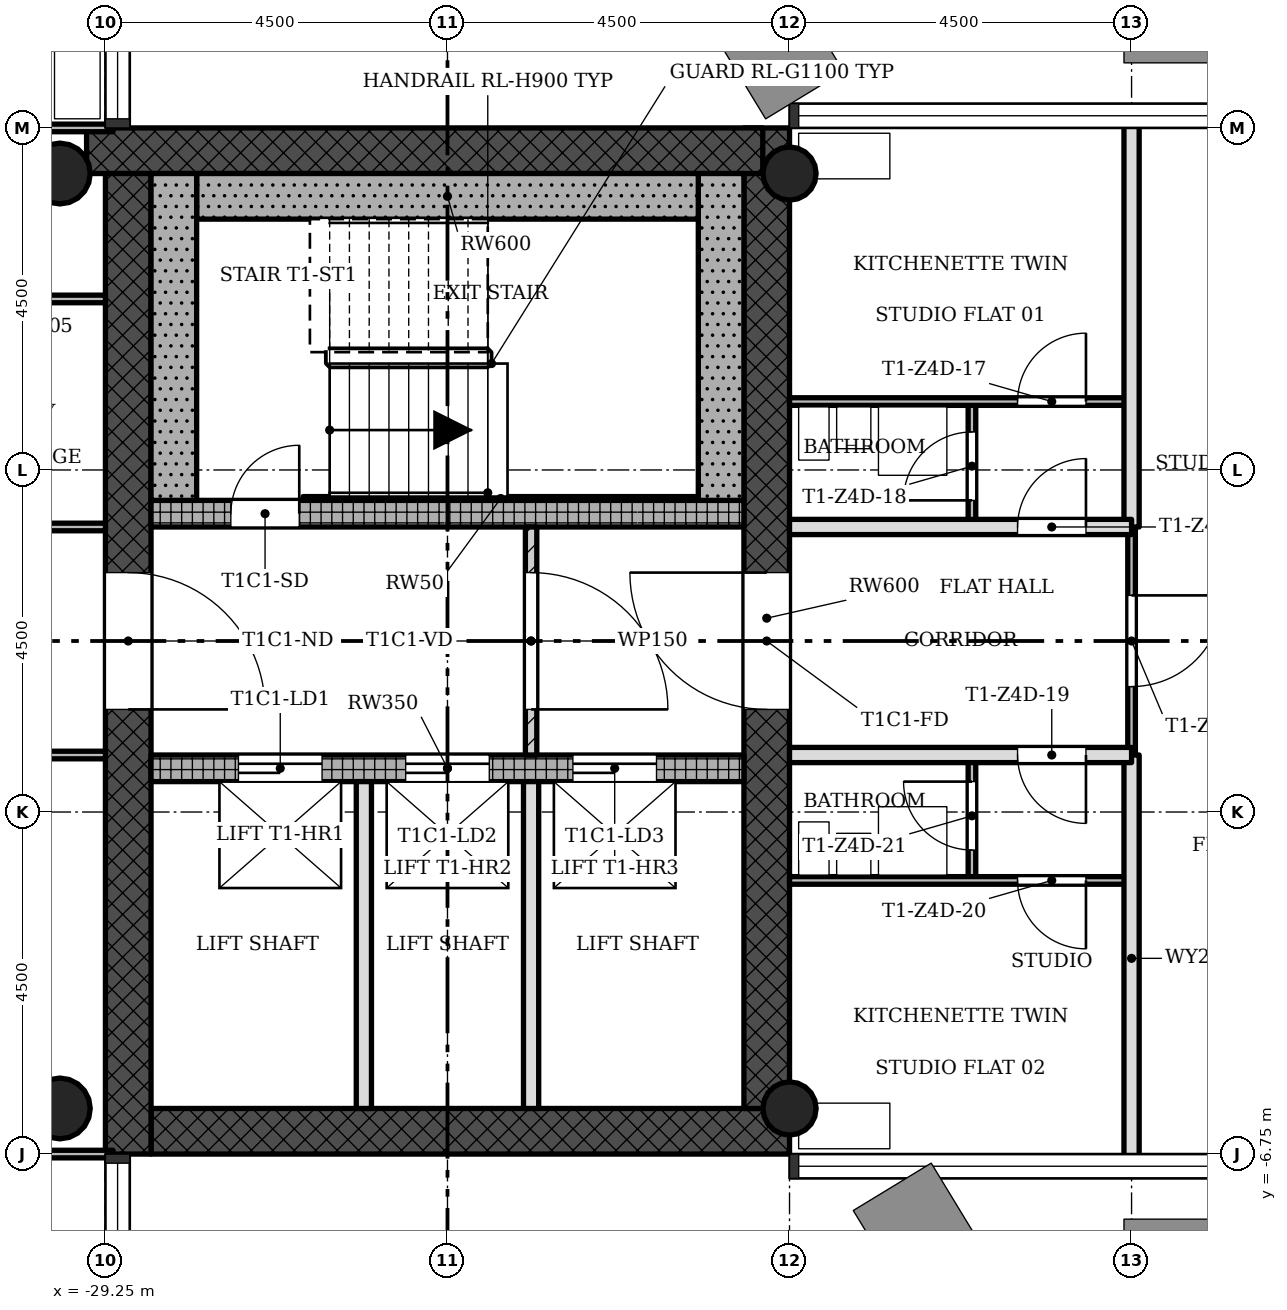
"""IFC4 building model, lengths in metres.
Left out: names, types, materials, properties, quantities, classifications, styles, units other than length and angle.
Written with IfcOpenShell. Run it as: python <this file> out.ifc"""

import sys

from ifc_helpers import new_model, si_unit, direction, frame, frame_2d, origin, origin_2d, place, context, subcontext, project, spatial, rectangle, hollow_circle, extrude, element, fill, save


model = new_model("IFC4")
c1 = context("Model", 3, precision=1e-05, world=origin(), true_north=direction((0.0, 1.0)))
c2 = subcontext(c1, "Body", "Model", "MODEL_VIEW")
j1 = project(units=[si_unit("LENGTHUNIT", "METRE"), si_unit("PLANEANGLEUNIT", "RADIAN")], contexts=[c1])
p1 = place(None, origin())
s1 = spatial("IfcSite", under=j1, at=p1, CompositionType="ELEMENT")
p2 = place(p1, origin())
s2 = spatial("IfcBuilding", under=s1, at=p2, CompositionType="ELEMENT")
p3 = place(p2, frame((0.0, 0.0, 196.0)))
s3 = spatial("IfcBuildingStorey", under=s2, at=p3, CompositionType="ELEMENT", Elevation=196.0)
p4 = place(p3, frame((-28.65, -6.45, 0.0), z_axis=(0.0, 0.0, 1.0), x_axis=(1.0, 0.0, 0.0)))
e1 = element("IfcWall", 1, at=p4, inside=s3, PredefinedType="SHEAR", context=c2, shape_type="SweptSolid", body=[
    extrude(rectangle(XDim=8.4, YDim=0.6, at=frame_2d((4.2, 0.0))), origin(), (0.0, 0.0, 1.0), 3.4),
])
p5 = place(p3, frame((-20.55, -6.15, 0.0), z_axis=(0.0, 0.0, 1.0), x_axis=(0.0, 1.0, 0.0)))
e2 = element("IfcWall", 2, at=p5, inside=s3, PredefinedType="SHEAR", context=c2, shape_type="SweptSolid", body=[
    extrude(rectangle(XDim=12.9, YDim=0.6, at=frame_2d((6.45, 0.0))), origin(), (0.0, 0.0, 1.0), 3.4),
])
p6 = place(p5, frame((5.25, 0.0, 0.0)))
e3 = element("IfcOpeningElement", 3, at=p6, cuts=e2, PredefinedType="OPENING", context=c2, shape_type="SweptSolid", body=[
    extrude(rectangle(XDim=1.8, YDim=2.1, at=frame_2d((0.9, 1.05))), frame((0.0, 0.31, 0.0), z_axis=(0.0, -1.0, 0.0), x_axis=(1.0, 0.0, 0.0)), (0.0, 0.0, 1.0), 0.62),
])
p7 = place(p3, frame((-20.602, 6.45, 0.0), z_axis=(0.0, 0.0, 1.0), x_axis=(-1.0, 0.0, 0.0)))
e4 = element("IfcWall", 4, at=p7, inside=s3, PredefinedType="SHEAR", context=c2, shape_type="SweptSolid", body=[
    extrude(rectangle(XDim=8.896, YDim=0.6, at=frame_2d((4.448, 0.0))), origin(), (0.0, 0.0, 1.0), 3.4),
])
p8 = place(p3, frame((-28.95, 6.15, 0.0), z_axis=(0.0, 0.0, 1.0), x_axis=(0.0, -1.0, 0.0)))
e5 = element("IfcWall", 5, at=p8, inside=s3, PredefinedType="SHEAR", context=c2, shape_type="SweptSolid", body=[
    extrude(rectangle(XDim=12.9, YDim=0.6, at=frame_2d((6.45, 0.0))), origin(), (0.0, 0.0, 1.0), 3.4),
])
p9 = place(p8, frame((5.25, 0.0, 0.0)))
e6 = element("IfcOpeningElement", 6, at=p9, cuts=e5, PredefinedType="OPENING", context=c2, shape_type="SweptSolid", body=[
    extrude(rectangle(XDim=1.8, YDim=2.1, at=frame_2d((0.9, 1.05))), frame((0.0, 0.31, 0.0), z_axis=(0.0, -1.0, 0.0), x_axis=(1.0, 0.0, 0.0)), (0.0, 0.0, 1.0), 0.62),
])
p10 = place(p3, frame((-28.65, -1.675, 0.0), z_axis=(0.0, 0.0, 1.0), x_axis=(1.0, 0.0, 0.0)))
e7 = element("IfcWall", 7, at=p10, inside=s3, PredefinedType="SHEAR", context=c2, shape_type="SweptSolid", body=[
    extrude(rectangle(XDim=7.8, YDim=0.35, at=frame_2d((3.9, 0.0))), origin(), (0.0, 0.0, 1.0), 3.4),
])
p11 = place(p10, frame((1.15, 0.0, 0.0)))
e8 = element("IfcOpeningElement", 8, at=p11, cuts=e7, PredefinedType="OPENING", context=c2, shape_type="SweptSolid", body=[
    extrude(rectangle(XDim=1.1, YDim=2.1, at=frame_2d((0.55, 1.05))), frame((0.0, 0.185, 0.0), z_axis=(0.0, -1.0, 0.0), x_axis=(1.0, 0.0, 0.0)), (0.0, 0.0, 1.0), 0.37),
])
p12 = place(p10, frame((3.35, 0.0, 0.0)))
e9 = element("IfcOpeningElement", 9, at=p12, cuts=e7, PredefinedType="OPENING", context=c2, shape_type="SweptSolid", body=[
    extrude(rectangle(XDim=1.1, YDim=2.1, at=frame_2d((0.55, 1.05))), frame((0.0, 0.185, 0.0), z_axis=(0.0, -1.0, 0.0), x_axis=(1.0, 0.0, 0.0)), (0.0, 0.0, 1.0), 0.37),
])
p13 = place(p10, frame((5.55, 0.0, 0.0)))
e10 = element("IfcOpeningElement", 10, at=p13, cuts=e7, PredefinedType="OPENING", context=c2, shape_type="SweptSolid", body=[
    extrude(rectangle(XDim=1.1, YDim=2.1, at=frame_2d((0.55, 1.05))), frame((0.0, 0.185, 0.0), z_axis=(0.0, -1.0, 0.0), x_axis=(1.0, 0.0, 0.0)), (0.0, 0.0, 1.0), 0.37),
])
p14 = place(p3, frame((-28.65, 1.675, 0.0), z_axis=(0.0, 0.0, 1.0), x_axis=(1.0, 0.0, 0.0)))
e11 = element("IfcWall", 11, at=p14, inside=s3, PredefinedType="SHEAR", context=c2, shape_type="SweptSolid", body=[
    extrude(rectangle(XDim=7.8, YDim=0.35, at=frame_2d((3.9, 0.0))), origin(), (0.0, 0.0, 1.0), 3.4),
])
p15 = place(p14, frame((1.05, 0.0, 0.0)))
e12 = element("IfcOpeningElement", 12, at=p15, cuts=e11, PredefinedType="OPENING", context=c2, shape_type="SweptSolid", body=[
    extrude(rectangle(XDim=0.9, YDim=2.1, at=frame_2d((0.45, 1.05))), frame((0.0, 0.185, 0.0), z_axis=(0.0, -1.0, 0.0), x_axis=(1.0, 0.0, 0.0)), (0.0, 0.0, 1.0), 0.37),
])
for number, where, z_axis, x_axis in (
    (13, (-20.25, -6.15, 0.0), (0.0, 0.0, 1.0), (1.0, 0.0, 0.0)),
    (14, (-20.25, 6.15, 0.0), (0.0, 0.0, 1.0), (1.0, 0.0, 0.0)),
):
    element("IfcColumn", number, at=place(p3, frame(where, z_axis=z_axis, x_axis=x_axis)), inside=s3, PredefinedType="COLUMN", context=c2, shape_type="SweptSolid", body=[
        extrude(hollow_circle(Radius=0.35, WallThickness=0.025, at=origin_2d()), origin(), (0.0, 0.0, 1.0), 3.4),
    ])
for number, where, z_axis, x_axis in (
    (15, (-29.85, -6.15, 0.0), (0.0, 0.0, 1.0), (1.0, 0.0, 0.0)),
    (16, (-29.85, 6.15, 0.0), (0.0, 0.0, 1.0), (1.0, 0.0, 0.0)),
):
    element("IfcColumn", number, at=place(p3, frame(where, z_axis=z_axis, x_axis=x_axis)), inside=s3, PredefinedType="COLUMN", context=c2, shape_type="SweptSolid", body=[
        extrude(hollow_circle(Radius=0.4, WallThickness=0.028, at=origin_2d()), origin(), (0.0, 0.0, 1.0), 3.4),
    ])
p16 = place(p3, frame((-23.65, -1.5, 0.0), z_axis=(0.0, 0.0, 1.0), x_axis=(0.0, 1.0, 0.0)))
e17 = element("IfcWall", 17, at=p16, inside=s3, PredefinedType="PARTITIONING", context=c2, shape_type="SweptSolid", body=[
    extrude(rectangle(XDim=3.0, YDim=0.15, at=frame_2d((1.5, 0.0))), origin(), (0.0, 0.0, 1.0), 3.0),
])
p17 = place(p16, frame((0.6, 0.0, 0.0)))
e18 = element("IfcOpeningElement", 18, at=p17, cuts=e17, PredefinedType="OPENING", context=c2, shape_type="SweptSolid", body=[
    extrude(rectangle(XDim=1.8, YDim=2.1, at=frame_2d((0.9, 1.05))), frame((0.0, 0.085, 0.0), z_axis=(0.0, -1.0, 0.0), x_axis=(1.0, 0.0, 0.0)), (0.0, 0.0, 1.0), 0.17),
])
for number, where, z_axis, x_axis in (
    (19, (-25.85, -6.15, 0.0), (0.0, 0.0, 1.0), (0.0, 1.0, 0.0)),
    (20, (-23.65, -6.15, 0.0), (0.0, 0.0, 1.0), (0.0, 1.0, 0.0)),
):
    element("IfcWall", number, at=place(p3, frame(where, z_axis=z_axis, x_axis=x_axis)), inside=s3, PredefinedType="SOLIDWALL", context=c2, shape_type="SweptSolid", body=[
        extrude(rectangle(XDim=4.3, YDim=0.2, at=frame_2d((2.15, 0.0))), origin(), (0.0, 0.0, 1.0), 3.0),
    ])
p18 = place(p3, frame((-17.85, -3.15, 0.0), z_axis=(0.0, 0.0, 1.0), x_axis=(0.0, 1.0, 0.0)))
e21 = element("IfcWall", 21, at=p18, inside=s3, PredefinedType="PARTITIONING", context=c2, shape_type="SweptSolid", body=[
    extrude(rectangle(XDim=1.65, YDim=0.1, at=frame_2d((0.825, 0.0))), origin(), (0.0, 0.0, 1.0), 3.0),
])
p19 = place(p18, frame((0.4, 0.0, 0.0)))
e22 = element("IfcOpeningElement", 22, at=p19, cuts=e21, PredefinedType="OPENING", context=c2, shape_type="SweptSolid", body=[
    extrude(rectangle(XDim=0.9, YDim=2.1, at=frame_2d((0.45, 1.05))), frame((0.0, 0.06, 0.0), z_axis=(0.0, -1.0, 0.0), x_axis=(1.0, 0.0, 0.0)), (0.0, 0.0, 1.0), 0.12),
])
p20 = place(p3, frame((-17.85, 1.5, 0.0), z_axis=(0.0, 0.0, 1.0), x_axis=(0.0, 1.0, 0.0)))
e23 = element("IfcWall", 23, at=p20, inside=s3, PredefinedType="PARTITIONING", context=c2, shape_type="SweptSolid", body=[
    extrude(rectangle(XDim=1.65, YDim=0.1, at=frame_2d((0.825, 0.0))), origin(), (0.0, 0.0, 1.0), 3.0),
])
p21 = place(p20, frame((0.35, 0.0, 0.0)))
e24 = element("IfcOpeningElement", 24, at=p21, cuts=e23, PredefinedType="OPENING", context=c2, shape_type="SweptSolid", body=[
    extrude(rectangle(XDim=0.9, YDim=2.1, at=frame_2d((0.45, 1.05))), frame((0.0, 0.06, 0.0), z_axis=(0.0, -1.0, 0.0), x_axis=(1.0, 0.0, 0.0)), (0.0, 0.0, 1.0), 0.12),
])
p22 = place(p3, frame((-15.75, -1.5, 0.0), z_axis=(0.0, 0.0, 1.0), x_axis=(0.0, 1.0, 0.0)))
e25 = element("IfcWall", 25, at=p22, inside=s3, PredefinedType="PARTITIONING", context=c2, shape_type="SweptSolid", body=[
    extrude(rectangle(XDim=3.0, YDim=0.1, at=frame_2d((1.5, 0.0))), origin(), (0.0, 0.0, 1.0), 3.0),
])
p23 = place(p22, frame((0.9, 0.0, 0.0)))
e26 = element("IfcOpeningElement", 26, at=p23, cuts=e25, PredefinedType="OPENING", context=c2, shape_type="SweptSolid", body=[
    extrude(rectangle(XDim=1.2, YDim=2.1, at=frame_2d((0.6, 1.05))), frame((0.0, 0.06, 0.0), z_axis=(0.0, -1.0, 0.0), x_axis=(1.0, 0.0, 0.0)), (0.0, 0.0, 1.0), 0.12),
])
for number, where, z_axis, x_axis in (
    (27, (-15.75, -6.85, 0.0), (0.0, 0.0, 1.0), (0.0, 1.0, 0.0)),
    (28, (-15.75, 1.5, 0.0), (0.0, 0.0, 1.0), (0.0, 1.0, 0.0)),
):
    element("IfcWall", number, at=place(p3, frame(where, z_axis=z_axis, x_axis=x_axis)), inside=s3, PredefinedType="SOLIDWALL", context=c2, shape_type="SweptSolid", body=[
        extrude(rectangle(XDim=5.35, YDim=0.2, at=frame_2d((2.675, 0.0))), origin(), (0.0, 0.0, 1.0), 3.0),
    ])
p24 = place(p3, frame((-35.1, -6.75, 0.0), z_axis=(0.0, 0.0, 1.0), x_axis=(1.0, 0.0, 0.0)))
e29 = element("IfcWall", 29, at=p24, inside=s3, PredefinedType="PARTITIONING", context=c2, shape_type="SweptSolid", body=[
    extrude(rectangle(XDim=5.95, YDim=0.1, at=frame_2d((2.975, 0.0))), origin(), (0.0, 0.0, 1.0), 3.0),
])
p25 = place(p3, frame((-20.25, -3.15, 0.0), z_axis=(0.0, 0.0, 1.0), x_axis=(1.0, 0.0, 0.0)))
e30 = element("IfcWall", 30, at=p25, inside=s3, PredefinedType="PARTITIONING", context=c2, shape_type="SweptSolid", body=[
    extrude(rectangle(XDim=4.5, YDim=0.1, at=frame_2d((2.25, 0.0))), origin(), (0.0, 0.0, 1.0), 3.0),
])
p26 = place(p25, frame((3.0, 0.0, 0.0)))
e31 = element("IfcOpeningElement", 31, at=p26, cuts=e30, PredefinedType="OPENING", context=c2, shape_type="SweptSolid", body=[
    extrude(rectangle(XDim=0.9, YDim=2.1, at=frame_2d((0.45, 1.05))), frame((0.0, 0.06, 0.0), z_axis=(0.0, -1.0, 0.0), x_axis=(1.0, 0.0, 0.0)), (0.0, 0.0, 1.0), 0.12),
])
p27 = place(p3, frame((-31.5, -1.5, 0.0), z_axis=(0.0, 0.0, 1.0), x_axis=(1.0, 0.0, 0.0)))
e32 = element("IfcWall", 32, at=p27, inside=s3, PredefinedType="PARTITIONING", context=c2, shape_type="SweptSolid", body=[
    extrude(rectangle(XDim=2.25, YDim=0.1, at=frame_2d((1.125, 0.0))), origin(), (0.0, 0.0, 1.0), 3.0),
])
p28 = place(p3, frame((-20.25, -1.5, 0.0), z_axis=(0.0, 0.0, 1.0), x_axis=(1.0, 0.0, 0.0)))
e33 = element("IfcWall", 33, at=p28, inside=s3, PredefinedType="SOLIDWALL", context=c2, shape_type="SweptSolid", body=[
    extrude(rectangle(XDim=4.5, YDim=0.2, at=frame_2d((2.25, 0.0))), origin(), (0.0, 0.0, 1.0), 3.0),
])
p29 = place(p28, frame((3.0, 0.0, 0.0)))
e34 = element("IfcOpeningElement", 34, at=p29, cuts=e33, PredefinedType="OPENING", context=c2, shape_type="SweptSolid", body=[
    extrude(rectangle(XDim=0.9, YDim=2.1, at=frame_2d((0.45, 1.05))), frame((0.0, 0.11, 0.0), z_axis=(0.0, -1.0, 0.0), x_axis=(1.0, 0.0, 0.0)), (0.0, 0.0, 1.0), 0.22),
])
p30 = place(p3, frame((-31.5, 1.5, 0.0), z_axis=(0.0, 0.0, 1.0), x_axis=(1.0, 0.0, 0.0)))
e35 = element("IfcWall", 35, at=p30, inside=s3, PredefinedType="PARTITIONING", context=c2, shape_type="SweptSolid", body=[
    extrude(rectangle(XDim=2.25, YDim=0.1, at=frame_2d((1.125, 0.0))), origin(), (0.0, 0.0, 1.0), 3.0),
])
p31 = place(p3, frame((-20.25, 1.5, 0.0), z_axis=(0.0, 0.0, 1.0), x_axis=(1.0, 0.0, 0.0)))
e36 = element("IfcWall", 36, at=p31, inside=s3, PredefinedType="SOLIDWALL", context=c2, shape_type="SweptSolid", body=[
    extrude(rectangle(XDim=4.5, YDim=0.2, at=frame_2d((2.25, 0.0))), origin(), (0.0, 0.0, 1.0), 3.0),
])
p32 = place(p31, frame((3.0, 0.0, 0.0)))
e37 = element("IfcOpeningElement", 37, at=p32, cuts=e36, PredefinedType="OPENING", context=c2, shape_type="SweptSolid", body=[
    extrude(rectangle(XDim=0.9, YDim=2.1, at=frame_2d((0.45, 1.05))), frame((0.0, 0.11, 0.0), z_axis=(0.0, -1.0, 0.0), x_axis=(1.0, 0.0, 0.0)), (0.0, 0.0, 1.0), 0.22),
])
p33 = place(p3, frame((-20.25, 3.15, 0.0), z_axis=(0.0, 0.0, 1.0), x_axis=(1.0, 0.0, 0.0)))
e38 = element("IfcWall", 38, at=p33, inside=s3, PredefinedType="PARTITIONING", context=c2, shape_type="SweptSolid", body=[
    extrude(rectangle(XDim=4.5, YDim=0.1, at=frame_2d((2.25, 0.0))), origin(), (0.0, 0.0, 1.0), 3.0),
])
p34 = place(p33, frame((3.0, 0.0, 0.0)))
e39 = element("IfcOpeningElement", 39, at=p34, cuts=e38, PredefinedType="OPENING", context=c2, shape_type="SweptSolid", body=[
    extrude(rectangle(XDim=0.9, YDim=2.1, at=frame_2d((0.45, 1.05))), frame((0.0, 0.06, 0.0), z_axis=(0.0, -1.0, 0.0), x_axis=(1.0, 0.0, 0.0)), (0.0, 0.0, 1.0), 0.12),
])
p35 = place(p3, frame((-35.1, 4.5, 0.0), z_axis=(0.0, 0.0, 1.0), x_axis=(1.0, 0.0, 0.0)))
e40 = element("IfcWall", 40, at=p35, inside=s3, PredefinedType="PARTITIONING", context=c2, shape_type="SweptSolid", body=[
    extrude(rectangle(XDim=5.85, YDim=0.1, at=frame_2d((2.925, 0.0))), origin(), (0.0, 0.0, 1.0), 3.0),
])
p36 = place(p35, frame((1.35, 0.0, 0.0)))
e41 = element("IfcOpeningElement", 41, at=p36, cuts=e40, PredefinedType="OPENING", context=c2, shape_type="SweptSolid", body=[
    extrude(rectangle(XDim=0.9, YDim=2.1, at=frame_2d((0.45, 1.05))), frame((0.0, 0.06, 0.0), z_axis=(0.0, -1.0, 0.0), x_axis=(1.0, 0.0, 0.0)), (0.0, 0.0, 1.0), 0.12),
])
p37 = place(p3, frame((-35.1, 6.75, 0.0), z_axis=(0.0, 0.0, 1.0), x_axis=(1.0, 0.0, 0.0)))
e42 = element("IfcWall", 42, at=p37, inside=s3, PredefinedType="PARTITIONING", context=c2, shape_type="SweptSolid", body=[
    extrude(rectangle(XDim=5.95, YDim=0.1, at=frame_2d((2.975, 0.0))), origin(), (0.0, 0.0, 1.0), 3.0),
])
p38 = place(p3, frame((-21.15, 1.85, 0.0), z_axis=(0.0, 0.0, 1.0), x_axis=(0.0, 1.0, 0.0)))
e43 = element("IfcWall", 43, at=p38, inside=s3, PredefinedType="SHEAR", context=c2, shape_type="SweptSolid", body=[
    extrude(rectangle(XDim=4.3, YDim=0.6, at=frame_2d((2.15, 0.0))), origin(), (0.0, 0.0, 1.0), 3.4),
])
p39 = place(p3, frame((-28.05, 5.85, 0.0), z_axis=(0.0, 0.0, 1.0), x_axis=(1.0, 0.0, 0.0)))
e44 = element("IfcWall", 44, at=p39, inside=s3, PredefinedType="SHEAR", context=c2, shape_type="SweptSolid", body=[
    extrude(rectangle(XDim=6.6, YDim=0.6, at=frame_2d((3.3, 0.0))), origin(), (0.0, 0.0, 1.0), 3.4),
])
p40 = place(p3, frame((-28.35, 1.85, 0.0), z_axis=(0.0, 0.0, 1.0), x_axis=(0.0, 1.0, 0.0)))
e45 = element("IfcWall", 45, at=p40, inside=s3, PredefinedType="SHEAR", context=c2, shape_type="SweptSolid", body=[
    extrude(rectangle(XDim=4.3, YDim=0.6, at=frame_2d((2.15, 0.0))), origin(), (0.0, 0.0, 1.0), 3.4),
])
p41 = place(p3, frame((-26.65, 1.875, 0.0), z_axis=(0.0, 0.0, 1.0), x_axis=(1.0, 0.0, 0.0)))
e46 = element("IfcWall", 46, at=p41, inside=s3, PredefinedType="SHEAR", context=c2, shape_type="SweptSolid", body=[
    extrude(rectangle(XDim=5.2, YDim=0.05, at=frame_2d((2.6, 0.0))), origin(), (0.0, 0.0, 1.0), 3.4),
])
p42 = place(p17, origin())
e47 = element("IfcDoor", 47, at=p42, inside=s3, OperationType="SINGLE_SWING_LEFT", PredefinedType="DOOR", context=c2, shape_type="SweptSolid", body=[
    extrude(rectangle(XDim=1.8, YDim=2.1, at=frame_2d((0.9, 1.05))), frame((0.0, 0.025, 0.0), z_axis=(0.0, -1.0, 0.0), x_axis=(1.0, 0.0, 0.0)), (0.0, 0.0, 1.0), 0.05),
])
fill(e18, e47)
p43 = place(p32, origin())
e48 = element("IfcDoor", 48, at=p43, inside=s3, OperationType="SINGLE_SWING_LEFT", PredefinedType="DOOR", context=c2, shape_type="SweptSolid", body=[
    extrude(rectangle(XDim=0.9, YDim=2.1, at=frame_2d((0.45, 1.05))), frame((0.0, 0.025, 0.0), z_axis=(0.0, -1.0, 0.0), x_axis=(1.0, 0.0, 0.0)), (0.0, 0.0, 1.0), 0.05),
])
fill(e37, e48)
p44 = place(p34, origin())
e49 = element("IfcDoor", 49, at=p44, inside=s3, OperationType="SINGLE_SWING_LEFT", PredefinedType="DOOR", context=c2, shape_type="SweptSolid", body=[
    extrude(rectangle(XDim=0.9, YDim=2.1, at=frame_2d((0.45, 1.05))), frame((0.0, 0.025, 0.0), z_axis=(0.0, -1.0, 0.0), x_axis=(1.0, 0.0, 0.0)), (0.0, 0.0, 1.0), 0.05),
])
fill(e39, e49)
p45 = place(p21, origin())
e50 = element("IfcDoor", 50, at=p45, inside=s3, OperationType="SINGLE_SWING_RIGHT", PredefinedType="DOOR", context=c2, shape_type="SweptSolid", body=[
    extrude(rectangle(XDim=0.9, YDim=2.1, at=frame_2d((0.45, 1.05))), frame((0.0, 0.025, 0.0), z_axis=(0.0, -1.0, 0.0), x_axis=(1.0, 0.0, 0.0)), (0.0, 0.0, 1.0), 0.05),
])
fill(e24, e50)
p46 = place(p29, origin())
e51 = element("IfcDoor", 51, at=p46, inside=s3, OperationType="SINGLE_SWING_RIGHT", PredefinedType="DOOR", context=c2, shape_type="SweptSolid", body=[
    extrude(rectangle(XDim=0.9, YDim=2.1, at=frame_2d((0.45, 1.05))), frame((0.0, 0.025, 0.0), z_axis=(0.0, -1.0, 0.0), x_axis=(1.0, 0.0, 0.0)), (0.0, 0.0, 1.0), 0.05),
])
fill(e34, e51)
p47 = place(p26, origin())
e52 = element("IfcDoor", 52, at=p47, inside=s3, OperationType="SINGLE_SWING_RIGHT", PredefinedType="DOOR", context=c2, shape_type="SweptSolid", body=[
    extrude(rectangle(XDim=0.9, YDim=2.1, at=frame_2d((0.45, 1.05))), frame((0.0, 0.025, 0.0), z_axis=(0.0, -1.0, 0.0), x_axis=(1.0, 0.0, 0.0)), (0.0, 0.0, 1.0), 0.05),
])
fill(e31, e52)
p48 = place(p19, origin())
e53 = element("IfcDoor", 53, at=p48, inside=s3, OperationType="SINGLE_SWING_LEFT", PredefinedType="DOOR", context=c2, shape_type="SweptSolid", body=[
    extrude(rectangle(XDim=0.9, YDim=2.1, at=frame_2d((0.45, 1.05))), frame((0.0, 0.025, 0.0), z_axis=(0.0, -1.0, 0.0), x_axis=(1.0, 0.0, 0.0)), (0.0, 0.0, 1.0), 0.05),
])
fill(e22, e53)
p49 = place(p23, origin())
e54 = element("IfcDoor", 54, at=p49, inside=s3, OperationType="SINGLE_SWING_RIGHT", PredefinedType="DOOR", context=c2, shape_type="SweptSolid", body=[
    extrude(rectangle(XDim=1.2, YDim=2.1, at=frame_2d((0.6, 1.05))), frame((0.0, 0.025, 0.0), z_axis=(0.0, -1.0, 0.0), x_axis=(1.0, 0.0, 0.0)), (0.0, 0.0, 1.0), 0.05),
])
fill(e26, e54)
p50 = place(p15, origin())
e55 = element("IfcDoor", 55, at=p50, inside=s3, OperationType="SINGLE_SWING_LEFT", PredefinedType="DOOR", context=c2, shape_type="SweptSolid", body=[
    extrude(rectangle(XDim=0.9, YDim=2.1, at=frame_2d((0.45, 1.05))), frame((0.0, 0.025, 0.0), z_axis=(0.0, -1.0, 0.0), x_axis=(1.0, 0.0, 0.0)), (0.0, 0.0, 1.0), 0.05),
])
fill(e12, e55)
p51 = place(p11, origin())
e56 = element("IfcDoor", 56, at=p51, inside=s3, OperationType="SLIDING_TO_LEFT", PredefinedType="DOOR", context=c2, shape_type="SweptSolid", body=[
    extrude(rectangle(XDim=1.1, YDim=2.1, at=frame_2d((0.55, 1.05))), frame((0.0, 0.025, 0.0), z_axis=(0.0, -1.0, 0.0), x_axis=(1.0, 0.0, 0.0)), (0.0, 0.0, 1.0), 0.05),
])
fill(e8, e56)
p52 = place(p12, origin())
e57 = element("IfcDoor", 57, at=p52, inside=s3, OperationType="SLIDING_TO_LEFT", PredefinedType="DOOR", context=c2, shape_type="SweptSolid", body=[
    extrude(rectangle(XDim=1.1, YDim=2.1, at=frame_2d((0.55, 1.05))), frame((0.0, 0.025, 0.0), z_axis=(0.0, -1.0, 0.0), x_axis=(1.0, 0.0, 0.0)), (0.0, 0.0, 1.0), 0.05),
])
fill(e9, e57)
p53 = place(p13, origin())
e58 = element("IfcDoor", 58, at=p53, inside=s3, OperationType="SLIDING_TO_LEFT", PredefinedType="DOOR", context=c2, shape_type="SweptSolid", body=[
    extrude(rectangle(XDim=1.1, YDim=2.1, at=frame_2d((0.55, 1.05))), frame((0.0, 0.025, 0.0), z_axis=(0.0, -1.0, 0.0), x_axis=(1.0, 0.0, 0.0)), (0.0, 0.0, 1.0), 0.05),
])
fill(e10, e58)
p54 = place(p9, origin())
e59 = element("IfcDoor", 59, at=p54, inside=s3, OperationType="SINGLE_SWING_LEFT", PredefinedType="DOOR", context=c2, shape_type="SweptSolid", body=[
    extrude(rectangle(XDim=1.8, YDim=2.1, at=frame_2d((0.9, 1.05))), frame((0.0, 0.025, 0.0), z_axis=(0.0, -1.0, 0.0), x_axis=(1.0, 0.0, 0.0)), (0.0, 0.0, 1.0), 0.05),
])
fill(e6, e59)
p55 = place(p6, origin())
e60 = element("IfcDoor", 60, at=p55, inside=s3, OperationType="SINGLE_SWING_LEFT", PredefinedType="DOOR", context=c2, shape_type="SweptSolid", body=[
    extrude(rectangle(XDim=1.8, YDim=2.1, at=frame_2d((0.9, 1.05))), frame((0.0, 0.025, 0.0), z_axis=(0.0, -1.0, 0.0), x_axis=(1.0, 0.0, 0.0)), (0.0, 0.0, 1.0), 0.05),
])
fill(e3, e60)
save(model, sys.argv[1])
